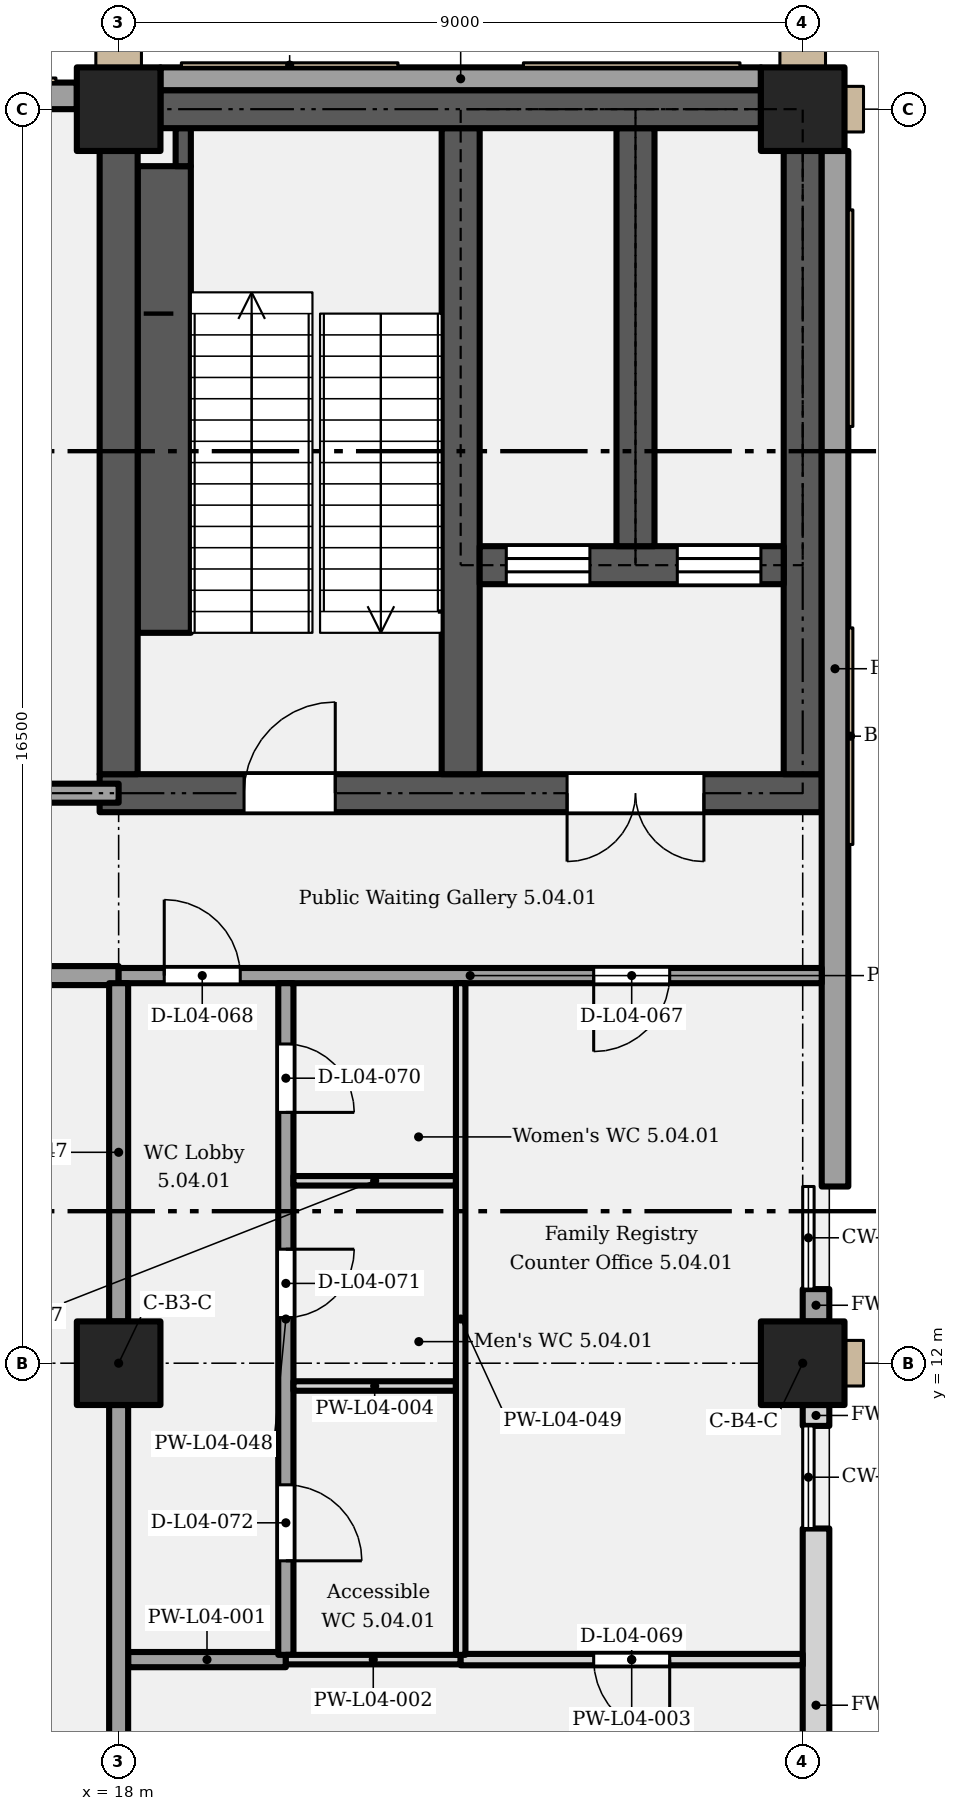
"""IFC4 building model, lengths in metres.
Left out: names, types, materials, properties, quantities, classifications, styles, units other than length and angle.
Written with IfcOpenShell. Run it as: python <this file> out.ifc"""

import sys

from ifc_helpers import new_model, si_unit, direction, frame, frame_2d, origin, origin_2d, place, context, subcontext, project, spatial, rectangle, extrude, element, fill, save


model = new_model("IFC4")
c1 = context("Model", 3, precision=1e-05, world=origin(), true_north=direction((0.0, 1.0)))
c2 = subcontext(c1, "Body", "Model", "MODEL_VIEW")
j1 = project(units=[si_unit("LENGTHUNIT", "METRE"), si_unit("PLANEANGLEUNIT", "RADIAN")], contexts=[c1])
p1 = place(None, origin())
s1 = spatial("IfcSite", under=j1, at=p1, CompositionType="ELEMENT")
p2 = place(p1, origin())
s2 = spatial("IfcBuilding", under=s1, at=p2, CompositionType="ELEMENT")
p3 = place(p2, frame((0.0, 0.0, 22.8)))
s3 = spatial("IfcBuildingStorey", under=s2, at=p3, CompositionType="ELEMENT", Elevation=22.8)
for number, where, z_axis, x_axis in (
    (1, (18.0, 12.0, 0.0), (0.0, 0.0, 1.0), (1.0, 0.0, 0.0)),
    (2, (27.0, 12.0, 0.0), (0.0, 0.0, 1.0), (1.0, 0.0, 0.0)),
    (3, (18.0, 28.5, 0.0), (0.0, 0.0, 1.0), (1.0, 0.0, 0.0)),
    (4, (27.0, 28.5, 0.0), (0.0, 0.0, 1.0), (1.0, 0.0, 0.0)),
):
    element("IfcColumn", number, at=place(p3, frame(where, z_axis=z_axis, x_axis=x_axis)), inside=s3, PredefinedType="COLUMN", context=c2, shape_type="SweptSolid", body=[
        extrude(rectangle(XDim=1.1, YDim=1.1, at=origin_2d()), origin(), (0.0, 0.0, 1.0), 5.4),
    ])
p4 = place(p3, frame((17.75, 19.5, 0.0), z_axis=(0.0, 0.0, 1.0), x_axis=(1.0, 0.0, 0.0)))
e5 = element("IfcWall", 5, at=p4, inside=s3, PredefinedType="SHEAR", context=c2, shape_type="SweptSolid", body=[
    extrude(rectangle(XDim=9.5, YDim=0.5, at=frame_2d((4.75, 0.0))), origin(), (0.0, 0.0, 1.0), 5.15),
])
p5 = place(p4, frame((1.9, 0.0, 0.0)))
e6 = element("IfcOpeningElement", 6, at=p5, cuts=e5, PredefinedType="OPENING", context=c2, shape_type="SweptSolid", body=[
    extrude(rectangle(XDim=1.2, YDim=2.1, at=frame_2d((0.6, 1.05))), frame((0.0, 0.26, 0.0), z_axis=(0.0, -1.0, 0.0), x_axis=(1.0, 0.0, 0.0)), (0.0, 0.0, 1.0), 0.52),
])
p6 = place(p4, frame((7.95, 0.0, 0.0), z_axis=(0.0, 0.0, 1.0), x_axis=(-1.0, 0.0, 0.0)))
e7 = element("IfcOpeningElement", 7, at=p6, cuts=e5, PredefinedType="OPENING", context=c2, shape_type="SweptSolid", body=[
    extrude(rectangle(XDim=1.8, YDim=2.1, at=frame_2d((0.9, 1.05))), frame((0.0, 0.26, 0.0), z_axis=(0.0, -1.0, 0.0), x_axis=(1.0, 0.0, 0.0)), (0.0, 0.0, 1.0), 0.52),
])
p7 = place(p3, frame((18.0, 19.75, 0.0), z_axis=(0.0, 0.0, 1.0), x_axis=(0.0, 1.0, 0.0)))
e8 = element("IfcWall", 8, at=p7, inside=s3, PredefinedType="SHEAR", context=c2, shape_type="SweptSolid", body=[
    extrude(rectangle(XDim=8.2, YDim=0.5, at=frame_2d((4.1, 0.0))), origin(), (0.0, 0.0, 1.0), 5.15),
])
p8 = place(p3, frame((22.5, 19.75, 0.0), z_axis=(0.0, 0.0, 1.0), x_axis=(0.0, 1.0, 0.0)))
e9 = element("IfcWall", 9, at=p8, inside=s3, PredefinedType="SHEAR", context=c2, shape_type="SweptSolid", body=[
    extrude(rectangle(XDim=8.5, YDim=0.5, at=frame_2d((4.25, 0.0))), origin(), (0.0, 0.0, 1.0), 5.15),
])
p9 = place(p3, frame((27.0, 19.75, 0.0), z_axis=(0.0, 0.0, 1.0), x_axis=(0.0, 1.0, 0.0)))
e10 = element("IfcWall", 10, at=p9, inside=s3, PredefinedType="SHEAR", context=c2, shape_type="SweptSolid", body=[
    extrude(rectangle(XDim=8.2, YDim=0.5, at=frame_2d((4.1, 0.0))), origin(), (0.0, 0.0, 1.0), 5.15),
])
p10 = place(p3, frame((22.75, 22.5, 0.0), z_axis=(0.0, 0.0, 1.0), x_axis=(1.0, 0.0, 0.0)))
e11 = element("IfcWall", 11, at=p10, inside=s3, PredefinedType="SHEAR", context=c2, shape_type="SweptSolid", body=[
    extrude(rectangle(XDim=4.0, YDim=0.5, at=frame_2d((2.0, 0.0))), origin(), (0.0, 0.0, 1.0), 5.15),
])
p11 = place(p10, frame((0.35, 0.0, 0.0)))
e12 = element("IfcOpeningElement", 12, at=p11, cuts=e11, PredefinedType="OPENING", context=c2, shape_type="SweptSolid", body=[
    extrude(rectangle(XDim=1.1, YDim=2.1, at=frame_2d((0.55, 1.05))), frame((0.0, 0.26, 0.0), z_axis=(0.0, -1.0, 0.0), x_axis=(1.0, 0.0, 0.0)), (0.0, 0.0, 1.0), 0.52),
])
p12 = place(p10, frame((2.6, 0.0, 0.0)))
e13 = element("IfcOpeningElement", 13, at=p12, cuts=e11, PredefinedType="OPENING", context=c2, shape_type="SweptSolid", body=[
    extrude(rectangle(XDim=1.1, YDim=2.1, at=frame_2d((0.55, 1.05))), frame((0.0, 0.26, 0.0), z_axis=(0.0, -1.0, 0.0), x_axis=(1.0, 0.0, 0.0)), (0.0, 0.0, 1.0), 0.52),
])
p13 = place(p3, frame((24.8, 22.75, 0.0), z_axis=(0.0, 0.0, 1.0), x_axis=(0.0, 1.0, 0.0)))
e14 = element("IfcWall", 14, at=p13, inside=s3, PredefinedType="SHEAR", context=c2, shape_type="SweptSolid", body=[
    extrude(rectangle(XDim=5.5, YDim=0.5, at=frame_2d((2.75, 0.0))), origin(), (0.0, 0.0, 1.0), 5.15),
])
p14 = place(p3, frame((18.55, 28.5, 0.0), z_axis=(0.0, 0.0, 1.0), x_axis=(1.0, 0.0, 0.0)))
e15 = element("IfcWall", 15, at=p14, inside=s3, PredefinedType="SHEAR", context=c2, shape_type="SweptSolid", body=[
    extrude(rectangle(XDim=7.9, YDim=0.5, at=frame_2d((3.95, 0.0))), origin(), (0.0, 0.0, 1.0), 5.15),
])
p15 = place(p3, frame((9.55, 28.675, 0.0), z_axis=(0.0, 0.0, 1.0), x_axis=(1.0, 0.0, 0.0)))
e16 = element("IfcWall", 16, at=p15, inside=s3, PredefinedType="SOLIDWALL", context=c2, shape_type="SweptSolid", body=[
    extrude(rectangle(XDim=7.9, YDim=0.35, at=frame_2d((3.95, 0.0))), origin(), (0.0, 0.0, 1.0), 5.15),
])
p16 = place(p3, frame((18.55, 28.9, 0.0), z_axis=(0.0, 0.0, 1.0), x_axis=(1.0, 0.0, 0.0)))
e17 = element("IfcWall", 17, at=p16, inside=s3, PredefinedType="SOLIDWALL", context=c2, shape_type="SweptSolid", body=[
    extrude(rectangle(XDim=7.9, YDim=0.3, at=frame_2d((3.95, 0.0))), origin(), (0.0, 0.0, 1.0), 5.15),
])
p17 = place(p3, frame((27.175, 5.175, 0.0), z_axis=(0.0, 0.0, 1.0), x_axis=(0.0, 1.0, 0.0)))
e18 = element("IfcWall", 18, at=p17, inside=s3, PredefinedType="SOLIDWALL", context=c2, shape_type="SweptSolid", body=[
    extrude(rectangle(XDim=4.65, YDim=0.35, at=frame_2d((2.325, 0.0))), origin(), (0.0, 0.0, 1.0), 5.15),
])
p18 = place(p3, frame((27.175, 11.175, 0.0), z_axis=(0.0, 0.0, 1.0), x_axis=(0.0, 1.0, 0.0)))
e19 = element("IfcWall", 19, at=p18, inside=s3, PredefinedType="SOLIDWALL", context=c2, shape_type="SweptSolid", body=[
    extrude(rectangle(XDim=0.275, YDim=0.35, at=frame_2d((0.137, 0.0))), origin(), (0.0, 0.0, 1.0), 5.15),
])
p19 = place(p3, frame((27.175, 12.55, 0.0), z_axis=(0.0, 0.0, 1.0), x_axis=(0.0, 1.0, 0.0)))
e20 = element("IfcWall", 20, at=p19, inside=s3, PredefinedType="SOLIDWALL", context=c2, shape_type="SweptSolid", body=[
    extrude(rectangle(XDim=0.425, YDim=0.35, at=frame_2d((0.212, 0.0))), origin(), (0.0, 0.0, 1.0), 5.15),
])
p20 = place(p3, frame((27.425, 14.325, 0.0), z_axis=(0.0, 0.0, 1.0), x_axis=(0.0, 1.0, 0.0)))
e21 = element("IfcWall", 21, at=p20, inside=s3, PredefinedType="SOLIDWALL", context=c2, shape_type="SweptSolid", body=[
    extrude(rectangle(XDim=13.625, YDim=0.35, at=frame_2d((6.812, 0.0))), origin(), (0.0, 0.0, 1.0), 5.15),
])
p21 = place(p3, frame((18.125, 8.1, 0.0), z_axis=(0.0, 0.0, 1.0), x_axis=(1.0, 0.0, 0.0)))
e22 = element("IfcWall", 22, at=p21, inside=s3, PredefinedType="PARTITIONING", context=c2, shape_type="SweptSolid", body=[
    extrude(rectangle(XDim=2.075, YDim=0.2, at=frame_2d((1.038, 0.0))), origin(), (0.0, 0.0, 1.0), 5.15),
])
p22 = place(p3, frame((20.2, 8.1, 0.0), z_axis=(0.0, 0.0, 1.0), x_axis=(1.0, 0.0, 0.0)))
e23 = element("IfcWall", 23, at=p22, inside=s3, PredefinedType="PARTITIONING", context=c2, shape_type="SweptSolid", body=[
    extrude(rectangle(XDim=2.3, YDim=0.125, at=frame_2d((1.15, 0.0))), origin(), (0.0, 0.0, 1.0), 5.15),
])
p23 = place(p3, frame((22.5, 8.1, 0.0), z_axis=(0.0, 0.0, 1.0), x_axis=(1.0, 0.0, 0.0)))
e24 = element("IfcWall", 24, at=p23, inside=s3, PredefinedType="PARTITIONING", context=c2, shape_type="SweptSolid", body=[
    extrude(rectangle(XDim=4.5, YDim=0.15, at=frame_2d((2.25, 0.0))), origin(), (0.0, 0.0, 1.0), 5.15),
])
p24 = place(p23, frame((2.75, 0.0, 0.0), z_axis=(0.0, 0.0, 1.0), x_axis=(-1.0, 0.0, 0.0)))
e25 = element("IfcOpeningElement", 25, at=p24, cuts=e24, PredefinedType="OPENING", context=c2, shape_type="SweptSolid", body=[
    extrude(rectangle(XDim=1.0, YDim=2.1, at=frame_2d((0.5, 1.05))), frame((0.0, 0.085, 0.0), z_axis=(0.0, -1.0, 0.0), x_axis=(1.0, 0.0, 0.0)), (0.0, 0.0, 1.0), 0.17),
])
p25 = place(p3, frame((20.3, 11.7, 0.0), z_axis=(0.0, 0.0, 1.0), x_axis=(1.0, 0.0, 0.0)))
e26 = element("IfcWall", 26, at=p25, inside=s3, PredefinedType="PARTITIONING", context=c2, shape_type="SweptSolid", body=[
    extrude(rectangle(XDim=2.137, YDim=0.125, at=frame_2d((1.069, 0.0))), origin(), (0.0, 0.0, 1.0), 4.4),
])
p26 = place(p3, frame((20.3, 14.4, 0.0), z_axis=(0.0, 0.0, 1.0), x_axis=(1.0, 0.0, 0.0)))
e27 = element("IfcWall", 27, at=p26, inside=s3, PredefinedType="PARTITIONING", context=c2, shape_type="SweptSolid", body=[
    extrude(rectangle(XDim=2.137, YDim=0.125, at=frame_2d((1.069, 0.0))), origin(), (0.0, 0.0, 1.0), 5.15),
])
p27 = place(p3, frame((9.0, 17.1, 0.0), z_axis=(0.0, 0.0, 1.0), x_axis=(1.0, 0.0, 0.0)))
e28 = element("IfcWall", 28, at=p27, inside=s3, PredefinedType="PARTITIONING", context=c2, shape_type="SweptSolid", body=[
    extrude(rectangle(XDim=9.0, YDim=0.25, at=frame_2d((4.5, 0.0))), origin(), (0.0, 0.0, 1.0), 5.15),
])
p28 = place(p27, frame((6.9, 0.0, 0.0), z_axis=(0.0, 0.0, 1.0), x_axis=(-1.0, 0.0, 0.0)))
e29 = element("IfcOpeningElement", 29, at=p28, cuts=e28, PredefinedType="OPENING", context=c2, shape_type="SweptSolid", body=[
    extrude(rectangle(XDim=1.8, YDim=2.4, at=frame_2d((0.9, 1.2))), frame((0.0, 0.135, 0.0), z_axis=(0.0, -1.0, 0.0), x_axis=(1.0, 0.0, 0.0)), (0.0, 0.0, 1.0), 0.27),
])
p29 = place(p27, frame((2.0, 0.0, 0.0), z_axis=(0.0, 0.0, 1.0), x_axis=(-1.0, 0.0, 0.0)))
e30 = element("IfcOpeningElement", 30, at=p29, cuts=e28, PredefinedType="OPENING", context=c2, shape_type="SweptSolid", body=[
    extrude(rectangle(XDim=1.0, YDim=2.1, at=frame_2d((0.5, 1.05))), frame((0.0, 0.135, 0.0), z_axis=(0.0, -1.0, 0.0), x_axis=(1.0, 0.0, 0.0)), (0.0, 0.0, 1.0), 0.27),
])
p30 = place(p3, frame((18.0, 17.1, 0.0), z_axis=(0.0, 0.0, 1.0), x_axis=(1.0, 0.0, 0.0)))
e31 = element("IfcWall", 31, at=p30, inside=s3, PredefinedType="PARTITIONING", context=c2, shape_type="SweptSolid", body=[
    extrude(rectangle(XDim=9.25, YDim=0.2, at=frame_2d((4.625, 0.0))), origin(), (0.0, 0.0, 1.0), 5.15),
])
p31 = place(p30, frame((7.25, 0.0, 0.0), z_axis=(0.0, 0.0, 1.0), x_axis=(-1.0, 0.0, 0.0)))
e32 = element("IfcOpeningElement", 32, at=p31, cuts=e31, PredefinedType="OPENING", context=c2, shape_type="SweptSolid", body=[
    extrude(rectangle(XDim=1.0, YDim=2.1, at=frame_2d((0.5, 1.05))), frame((0.0, 0.11, 0.0), z_axis=(0.0, -1.0, 0.0), x_axis=(1.0, 0.0, 0.0)), (0.0, 0.0, 1.0), 0.22),
])
p32 = place(p30, frame((0.6, 0.0, 0.0)))
e33 = element("IfcOpeningElement", 33, at=p32, cuts=e31, PredefinedType="OPENING", context=c2, shape_type="SweptSolid", body=[
    extrude(rectangle(XDim=1.0, YDim=2.1, at=frame_2d((0.5, 1.05))), frame((0.0, 0.11, 0.0), z_axis=(0.0, -1.0, 0.0), x_axis=(1.0, 0.0, 0.0)), (0.0, 0.0, 1.0), 0.22),
])
p33 = place(p3, frame((9.0, 19.5, 0.0), z_axis=(0.0, 0.0, 1.0), x_axis=(1.0, 0.0, 0.0)))
e34 = element("IfcWall", 34, at=p33, inside=s3, PredefinedType="PARTITIONING", context=c2, shape_type="SweptSolid", body=[
    extrude(rectangle(XDim=9.0, YDim=0.25, at=frame_2d((4.5, 0.0))), origin(), (0.0, 0.0, 1.0), 5.15),
])
p34 = place(p33, frame((5.1, 0.0, 0.0)))
e35 = element("IfcOpeningElement", 35, at=p34, cuts=e34, PredefinedType="OPENING", context=c2, shape_type="SweptSolid", body=[
    extrude(rectangle(XDim=1.8, YDim=2.4, at=frame_2d((0.9, 1.2))), frame((0.0, 0.135, 0.0), z_axis=(0.0, -1.0, 0.0), x_axis=(1.0, 0.0, 0.0)), (0.0, 0.0, 1.0), 0.27),
])
p35 = place(p33, frame((1.0, 0.0, 0.0)))
e36 = element("IfcOpeningElement", 36, at=p35, cuts=e34, PredefinedType="OPENING", context=c2, shape_type="SweptSolid", body=[
    extrude(rectangle(XDim=1.0, YDim=2.1, at=frame_2d((0.5, 1.05))), frame((0.0, 0.135, 0.0), z_axis=(0.0, -1.0, 0.0), x_axis=(1.0, 0.0, 0.0)), (0.0, 0.0, 1.0), 0.27),
])
p36 = place(p3, frame((18.0, 0.55, 0.0), z_axis=(0.0, 0.0, 1.0), x_axis=(0.0, 1.0, 0.0)))
e37 = element("IfcWall", 37, at=p36, inside=s3, PredefinedType="PARTITIONING", context=c2, shape_type="SweptSolid", body=[
    extrude(rectangle(XDim=10.9, YDim=0.25, at=frame_2d((5.45, 0.0))), origin(), (0.0, 0.0, 1.0), 4.4),
])
p37 = place(p3, frame((18.0, 12.55, 0.0), z_axis=(0.0, 0.0, 1.0), x_axis=(0.0, 1.0, 0.0)))
e38 = element("IfcWall", 38, at=p37, inside=s3, PredefinedType="PARTITIONING", context=c2, shape_type="SweptSolid", body=[
    extrude(rectangle(XDim=4.45, YDim=0.25, at=frame_2d((2.225, 0.0))), origin(), (0.0, 0.0, 1.0), 4.2),
])
p38 = place(p3, frame((20.2, 8.163, 0.0), z_axis=(0.0, 0.0, 1.0), x_axis=(0.0, 1.0, 0.0)))
e39 = element("IfcWall", 39, at=p38, inside=s3, PredefinedType="PARTITIONING", context=c2, shape_type="SweptSolid", body=[
    extrude(rectangle(XDim=8.837, YDim=0.2, at=frame_2d((4.419, 0.0))), origin(), (0.0, 0.0, 1.0), 5.15),
])
p39 = place(p38, frame((8.037, 0.0, 0.0), z_axis=(0.0, 0.0, 1.0), x_axis=(-1.0, 0.0, 0.0)))
e40 = element("IfcOpeningElement", 40, at=p39, cuts=e39, PredefinedType="OPENING", context=c2, shape_type="SweptSolid", body=[
    extrude(rectangle(XDim=0.9, YDim=2.1, at=frame_2d((0.45, 1.05))), frame((0.0, 0.11, 0.0), z_axis=(0.0, -1.0, 0.0), x_axis=(1.0, 0.0, 0.0)), (0.0, 0.0, 1.0), 0.22),
])
p40 = place(p38, frame((5.337, 0.0, 0.0), z_axis=(0.0, 0.0, 1.0), x_axis=(-1.0, 0.0, 0.0)))
e41 = element("IfcOpeningElement", 41, at=p40, cuts=e39, PredefinedType="OPENING", context=c2, shape_type="SweptSolid", body=[
    extrude(rectangle(XDim=0.9, YDim=2.1, at=frame_2d((0.45, 1.05))), frame((0.0, 0.11, 0.0), z_axis=(0.0, -1.0, 0.0), x_axis=(1.0, 0.0, 0.0)), (0.0, 0.0, 1.0), 0.22),
])
p41 = place(p38, frame((2.238, 0.0, 0.0), z_axis=(0.0, 0.0, 1.0), x_axis=(-1.0, 0.0, 0.0)))
e42 = element("IfcOpeningElement", 42, at=p41, cuts=e39, PredefinedType="OPENING", context=c2, shape_type="SweptSolid", body=[
    extrude(rectangle(XDim=1.0, YDim=2.1, at=frame_2d((0.5, 1.05))), frame((0.0, 0.11, 0.0), z_axis=(0.0, -1.0, 0.0), x_axis=(1.0, 0.0, 0.0)), (0.0, 0.0, 1.0), 0.22),
])
p42 = place(p3, frame((22.5, 8.163, 0.0), z_axis=(0.0, 0.0, 1.0), x_axis=(0.0, 1.0, 0.0)))
e43 = element("IfcWall", 43, at=p42, inside=s3, PredefinedType="PARTITIONING", context=c2, shape_type="SweptSolid", body=[
    extrude(rectangle(XDim=8.837, YDim=0.125, at=frame_2d((4.419, 0.0))), origin(), (0.0, 0.0, 1.0), 5.15),
])
p43 = place(p3, frame((18.6, 21.61, 0.0), z_axis=(0.0, 0.0, 1.0), x_axis=(0.0, 1.0, 0.0)))
e44 = element("IfcWall", 44, at=p43, inside=s3, PredefinedType="SHEAR", context=c2, shape_type="SweptSolid", body=[
    extrude(rectangle(XDim=6.14, YDim=0.7, at=frame_2d((3.07, 0.0))), origin(), (0.0, 0.0, 1.0), 2.587),
])
p44 = place(p3, frame((18.85, 27.75, 0.0), z_axis=(0.0, 0.0, 1.0), x_axis=(0.0, 1.0, 0.0)))
e45 = element("IfcWall", 45, at=p44, inside=s3, PredefinedType="SHEAR", context=c2, shape_type="SweptSolid", body=[
    extrude(rectangle(XDim=0.5, YDim=0.2, at=frame_2d((0.25, 0.0))), origin(), (0.0, 0.0, 1.0), 2.587),
])
p45 = place(p5, origin())
e46 = element("IfcDoor", 46, at=p45, inside=s3, OperationType="SINGLE_SWING_RIGHT", PredefinedType="DOOR", context=c2, shape_type="SweptSolid", body=[
    extrude(rectangle(XDim=1.2, YDim=2.1, at=frame_2d((0.6, 1.05))), frame((0.0, 0.025, 0.0), z_axis=(0.0, -1.0, 0.0), x_axis=(1.0, 0.0, 0.0)), (0.0, 0.0, 1.0), 0.05),
])
fill(e6, e46)
p46 = place(p6, origin())
e47 = element("IfcDoor", 47, at=p46, inside=s3, OperationType="DOUBLE_DOOR_SINGLE_SWING", PredefinedType="DOOR", context=c2, shape_type="SweptSolid", body=[
    extrude(rectangle(XDim=1.8, YDim=2.1, at=frame_2d((0.9, 1.05))), frame((0.0, 0.025, 0.0), z_axis=(0.0, -1.0, 0.0), x_axis=(1.0, 0.0, 0.0)), (0.0, 0.0, 1.0), 0.05),
])
fill(e7, e47)
p47 = place(p11, origin())
e48 = element("IfcDoor", 48, at=p47, inside=s3, OperationType="SLIDING_TO_LEFT", PredefinedType="DOOR", context=c2, shape_type="SweptSolid", body=[
    extrude(rectangle(XDim=1.1, YDim=2.1, at=frame_2d((0.55, 1.05))), frame((0.0, 0.025, 0.0), z_axis=(0.0, -1.0, 0.0), x_axis=(1.0, 0.0, 0.0)), (0.0, 0.0, 1.0), 0.05),
])
fill(e12, e48)
p48 = place(p12, origin())
e49 = element("IfcDoor", 49, at=p48, inside=s3, OperationType="SLIDING_TO_LEFT", PredefinedType="DOOR", context=c2, shape_type="SweptSolid", body=[
    extrude(rectangle(XDim=1.1, YDim=2.1, at=frame_2d((0.55, 1.05))), frame((0.0, 0.025, 0.0), z_axis=(0.0, -1.0, 0.0), x_axis=(1.0, 0.0, 0.0)), (0.0, 0.0, 1.0), 0.05),
])
fill(e13, e49)
p49 = place(p31, origin())
e50 = element("IfcDoor", 50, at=p49, inside=s3, OperationType="SINGLE_SWING_RIGHT", PredefinedType="DOOR", context=c2, shape_type="SweptSolid", body=[
    extrude(rectangle(XDim=1.0, YDim=2.1, at=frame_2d((0.5, 1.05))), frame((0.0, 0.025, 0.0), z_axis=(0.0, -1.0, 0.0), x_axis=(1.0, 0.0, 0.0)), (0.0, 0.0, 1.0), 0.05),
])
fill(e32, e50)
p50 = place(p32, origin())
e51 = element("IfcDoor", 51, at=p50, inside=s3, OperationType="SINGLE_SWING_LEFT", PredefinedType="DOOR", context=c2, shape_type="SweptSolid", body=[
    extrude(rectangle(XDim=1.0, YDim=2.1, at=frame_2d((0.5, 1.05))), frame((0.0, 0.025, 0.0), z_axis=(0.0, -1.0, 0.0), x_axis=(1.0, 0.0, 0.0)), (0.0, 0.0, 1.0), 0.05),
])
fill(e33, e51)
p51 = place(p24, origin())
e52 = element("IfcDoor", 52, at=p51, inside=s3, OperationType="SINGLE_SWING_LEFT", PredefinedType="DOOR", context=c2, shape_type="SweptSolid", body=[
    extrude(rectangle(XDim=1.0, YDim=2.1, at=frame_2d((0.5, 1.05))), frame((0.0, 0.025, 0.0), z_axis=(0.0, -1.0, 0.0), x_axis=(1.0, 0.0, 0.0)), (0.0, 0.0, 1.0), 0.05),
])
fill(e25, e52)
p52 = place(p39, origin())
e53 = element("IfcDoor", 53, at=p52, inside=s3, OperationType="SINGLE_SWING_RIGHT", PredefinedType="DOOR", context=c2, shape_type="SweptSolid", body=[
    extrude(rectangle(XDim=0.9, YDim=2.1, at=frame_2d((0.45, 1.05))), frame((0.0, 0.025, 0.0), z_axis=(0.0, -1.0, 0.0), x_axis=(1.0, 0.0, 0.0)), (0.0, 0.0, 1.0), 0.05),
])
fill(e40, e53)
p53 = place(p40, origin())
e54 = element("IfcDoor", 54, at=p53, inside=s3, OperationType="SINGLE_SWING_LEFT", PredefinedType="DOOR", context=c2, shape_type="SweptSolid", body=[
    extrude(rectangle(XDim=0.9, YDim=2.1, at=frame_2d((0.45, 1.05))), frame((0.0, 0.025, 0.0), z_axis=(0.0, -1.0, 0.0), x_axis=(1.0, 0.0, 0.0)), (0.0, 0.0, 1.0), 0.05),
])
fill(e41, e54)
p54 = place(p41, origin())
e55 = element("IfcDoor", 55, at=p54, inside=s3, OperationType="SINGLE_SWING_RIGHT", PredefinedType="DOOR", context=c2, shape_type="SweptSolid", body=[
    extrude(rectangle(XDim=1.0, YDim=2.1, at=frame_2d((0.5, 1.05))), frame((0.0, 0.025, 0.0), z_axis=(0.0, -1.0, 0.0), x_axis=(1.0, 0.0, 0.0)), (0.0, 0.0, 1.0), 0.05),
])
fill(e42, e55)
save(model, sys.argv[1])
